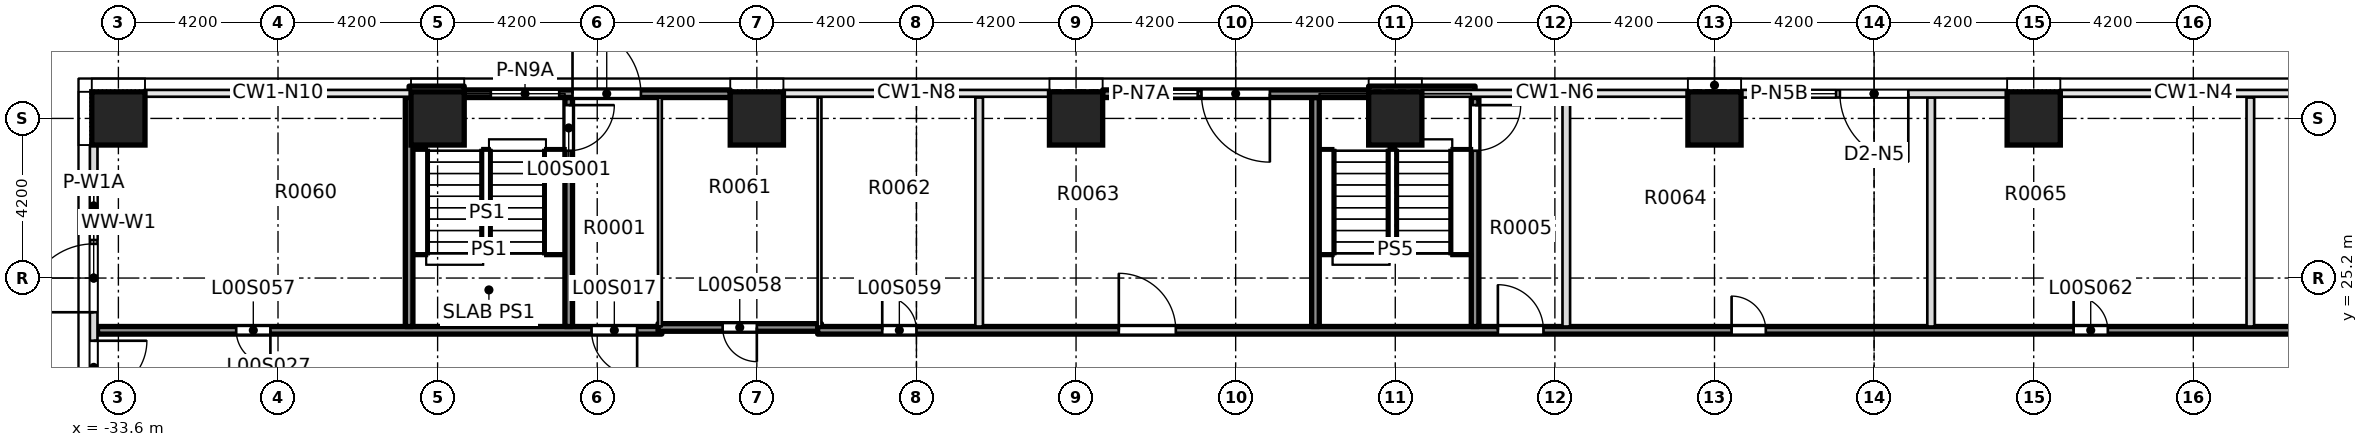
"""IFC4 building model, lengths in metres.
Left out: names, types, materials, properties, quantities, classifications, styles, units other than length and angle.
Written with IfcOpenShell. Run it as: python <this file> out.ifc"""

import sys

from ifc_helpers import new_model, si_unit, direction, frame, frame_2d, origin, origin_2d, place, context, subcontext, project, spatial, rectangle, extrude, element, fill, save


model = new_model("IFC4")
c1 = context("Model", 3, precision=1e-05, world=origin(), true_north=direction((0.0, 1.0)))
c2 = subcontext(c1, "Body", "Model", "MODEL_VIEW")
j1 = project(units=[si_unit("LENGTHUNIT", "METRE"), si_unit("PLANEANGLEUNIT", "RADIAN")], contexts=[c1])
p1 = place(None, origin())
s1 = spatial("IfcSite", under=j1, at=p1, CompositionType="ELEMENT")
p2 = place(p1, origin())
s2 = spatial("IfcBuilding", under=s1, at=p2, CompositionType="ELEMENT")
p3 = place(p2, origin())
s3 = spatial("IfcBuildingStorey", under=s2, at=p3, CompositionType="ELEMENT", Elevation=0.0)
for number, where, z_axis, x_axis in (
    (1, (-33.6, 29.4, 0.0), (0.0, 0.0, 1.0), (1.0, 0.0, 0.0)),
    (2, (-25.2, 29.4, 0.0), (0.0, 0.0, 1.0), (1.0, 0.0, 0.0)),
    (3, (-16.8, 29.4, 0.0), (0.0, 0.0, 1.0), (1.0, 0.0, 0.0)),
    (4, (-8.4, 29.4, 0.0), (0.0, 0.0, 1.0), (1.0, 0.0, 0.0)),
    (5, (0.0, 29.4, 0.0), (0.0, 0.0, 1.0), (1.0, 0.0, 0.0)),
    (6, (8.4, 29.4, 0.0), (0.0, 0.0, 1.0), (1.0, 0.0, 0.0)),
    (7, (16.8, 29.4, 0.0), (0.0, 0.0, 1.0), (1.0, 0.0, 0.0)),
):
    element("IfcColumn", number, at=place(p3, frame(where, z_axis=z_axis, x_axis=x_axis)), inside=s3, PredefinedType="COLUMN", context=c2, shape_type="SweptSolid", body=[
        extrude(rectangle(XDim=1.4, YDim=1.4, at=origin_2d()), origin(), (0.0, 0.0, 1.0), 7.5),
    ])
p4 = place(p3, frame((-34.15, 23.825, 0.0), z_axis=(0.0, 0.0, 1.0), x_axis=(1.0, 0.0, 0.0)))
e8 = element("IfcWall", 8, at=p4, inside=s3, PredefinedType="SOLIDWALL", context=c2, shape_type="SweptSolid", body=[
    extrude(rectangle(XDim=14.85, YDim=0.2, at=frame_2d((7.425, 0.0))), origin(), (0.0, 0.0, 1.0), 7.1),
])
p5 = place(p4, frame((13.0, 0.0, 0.0)))
e9 = element("IfcOpeningElement", 9, at=p5, cuts=e8, PredefinedType="OPENING", context=c2, shape_type="SweptSolid", body=[
    extrude(rectangle(XDim=1.2, YDim=2.1, at=frame_2d((0.6, 1.05))), frame((0.0, 0.11, 0.0), z_axis=(0.0, -1.0, 0.0), x_axis=(1.0, 0.0, 0.0)), (0.0, 0.0, 1.0), 0.22),
])
p6 = place(p4, frame((3.65, 0.0, 0.0)))
e10 = element("IfcOpeningElement", 10, at=p6, cuts=e8, PredefinedType="OPENING", context=c2, shape_type="SweptSolid", body=[
    extrude(rectangle(XDim=0.9, YDim=2.1, at=frame_2d((0.45, 1.05))), frame((0.0, 0.11, 0.0), z_axis=(0.0, -1.0, 0.0), x_axis=(1.0, 0.0, 0.0)), (0.0, 0.0, 1.0), 0.22),
])
p7 = place(p3, frame((-19.4, 23.9, 0.0), z_axis=(0.0, 0.0, 1.0), x_axis=(1.0, 0.0, 0.0)))
e11 = element("IfcWall", 11, at=p7, inside=s3, PredefinedType="SOLIDWALL", context=c2, shape_type="SweptSolid", body=[
    extrude(rectangle(XDim=4.3, YDim=0.2, at=frame_2d((2.15, 0.0))), origin(), (0.0, 0.0, 1.0), 7.1),
])
p8 = place(p7, frame((1.7, 0.0, 0.0)))
e12 = element("IfcOpeningElement", 12, at=p8, cuts=e11, PredefinedType="OPENING", context=c2, shape_type="SweptSolid", body=[
    extrude(rectangle(XDim=0.9, YDim=2.1, at=frame_2d((0.45, 1.05))), frame((0.0, 0.11, 0.0), z_axis=(0.0, -1.0, 0.0), x_axis=(1.0, 0.0, 0.0)), (0.0, 0.0, 1.0), 0.22),
])
p9 = place(p3, frame((-15.2, 23.825, 0.0), z_axis=(0.0, 0.0, 1.0), x_axis=(1.0, 0.0, 0.0)))
e13 = element("IfcWall", 13, at=p9, inside=s3, PredefinedType="SOLIDWALL", context=c2, shape_type="SweptSolid", body=[
    extrude(rectangle(XDim=51.45, YDim=0.2, at=frame_2d((25.725, 0.0))), origin(), (0.0, 0.0, 1.0), 7.1),
])
p10 = place(p9, frame((17.9, 0.0, 0.0)))
e14 = element("IfcOpeningElement", 14, at=p10, cuts=e13, PredefinedType="OPENING", context=c2, shape_type="SweptSolid", body=[
    extrude(rectangle(XDim=1.2, YDim=2.1, at=frame_2d((0.6, 1.05))), frame((0.0, 0.11, 0.0), z_axis=(0.0, -1.0, 0.0), x_axis=(1.0, 0.0, 0.0)), (0.0, 0.0, 1.0), 0.22),
])
p11 = place(p9, frame((1.7, 0.0, 0.0)))
e15 = element("IfcOpeningElement", 15, at=p11, cuts=e13, PredefinedType="OPENING", context=c2, shape_type="SweptSolid", body=[
    extrude(rectangle(XDim=0.9, YDim=2.1, at=frame_2d((0.45, 1.05))), frame((0.0, 0.11, 0.0), z_axis=(0.0, -1.0, 0.0), x_axis=(1.0, 0.0, 0.0)), (0.0, 0.0, 1.0), 0.22),
])
p12 = place(p9, frame((7.925, 0.0, 0.0)))
e16 = element("IfcOpeningElement", 16, at=p12, cuts=e13, PredefinedType="OPENING", context=c2, shape_type="SweptSolid", body=[
    extrude(rectangle(XDim=1.5, YDim=2.1, at=frame_2d((0.75, 1.05))), frame((0.0, 0.11, 0.0), z_axis=(0.0, -1.0, 0.0), x_axis=(1.0, 0.0, 0.0)), (0.0, 0.0, 1.0), 0.22),
])
p13 = place(p9, frame((24.05, 0.0, 0.0)))
e17 = element("IfcOpeningElement", 17, at=p13, cuts=e13, PredefinedType="OPENING", context=c2, shape_type="SweptSolid", body=[
    extrude(rectangle(XDim=0.9, YDim=2.1, at=frame_2d((0.45, 1.05))), frame((0.0, 0.11, 0.0), z_axis=(0.0, -1.0, 0.0), x_axis=(1.0, 0.0, 0.0)), (0.0, 0.0, 1.0), 0.22),
])
p14 = place(p9, frame((33.05, 0.0, 0.0)))
e18 = element("IfcOpeningElement", 18, at=p14, cuts=e13, PredefinedType="OPENING", context=c2, shape_type="SweptSolid", body=[
    extrude(rectangle(XDim=0.9, YDim=2.1, at=frame_2d((0.45, 1.05))), frame((0.0, 0.11, 0.0), z_axis=(0.0, -1.0, 0.0), x_axis=(1.0, 0.0, 0.0)), (0.0, 0.0, 1.0), 0.22),
])
p15 = place(p9, frame((44.075, 0.0, 0.0)))
e19 = element("IfcOpeningElement", 19, at=p15, cuts=e13, PredefinedType="OPENING", context=c2, shape_type="SweptSolid", body=[
    extrude(rectangle(XDim=0.9, YDim=2.1, at=frame_2d((0.45, 1.05))), frame((0.0, 0.11, 0.0), z_axis=(0.0, -1.0, 0.0), x_axis=(1.0, 0.0, 0.0)), (0.0, 0.0, 1.0), 0.22),
])
p16 = place(p3, frame((-25.95, 23.925, 0.0), z_axis=(0.0, 0.0, 1.0), x_axis=(0.0, 1.0, 0.0)))
e20 = element("IfcWall", 20, at=p16, inside=s3, PredefinedType="SOLIDWALL", context=c2, shape_type="SweptSolid", body=[
    extrude(rectangle(XDim=6.025, YDim=0.2, at=frame_2d((3.012, 0.0))), origin(), (0.0, 0.0, 1.0), 7.1),
])
p17 = place(p3, frame((-21.75, 23.925, 0.0), z_axis=(0.0, 0.0, 1.0), x_axis=(0.0, 1.0, 0.0)))
e21 = element("IfcWall", 21, at=p17, inside=s3, PredefinedType="SOLIDWALL", context=c2, shape_type="SweptSolid", body=[
    extrude(rectangle(XDim=6.025, YDim=0.2, at=frame_2d((3.012, 0.0))), origin(), (0.0, 0.0, 1.0), 7.1),
])
p18 = place(p17, frame((4.625, 0.0, 0.0)))
e22 = element("IfcOpeningElement", 22, at=p18, cuts=e21, PredefinedType="OPENING", context=c2, shape_type="SweptSolid", body=[
    extrude(rectangle(XDim=1.2, YDim=2.1, at=frame_2d((0.6, 1.05))), frame((0.0, 0.11, 0.0), z_axis=(0.0, -1.0, 0.0), x_axis=(1.0, 0.0, 0.0)), (0.0, 0.0, 1.0), 0.22),
])
for number, where, z_axis, x_axis in (
    (23, (-19.35, 23.925, 0.0), (0.0, 0.0, 1.0), (0.0, 1.0, 0.0)),
    (24, (-15.15, 23.925, 0.0), (0.0, 0.0, 1.0), (0.0, 1.0, 0.0)),
):
    element("IfcWall", number, at=place(p3, frame(where, z_axis=z_axis, x_axis=x_axis)), inside=s3, PredefinedType="PARTITIONING", context=c2, shape_type="SweptSolid", body=[
        extrude(rectangle(XDim=6.025, YDim=0.1, at=frame_2d((3.012, 0.0))), origin(), (0.0, 0.0, 1.0), 7.1),
    ])
p19 = place(p3, frame((-10.95, 23.925, 0.0), z_axis=(0.0, 0.0, 1.0), x_axis=(0.0, 1.0, 0.0)))
e25 = element("IfcWall", 25, at=p19, inside=s3, PredefinedType="PARTITIONING", context=c2, shape_type="SweptSolid", body=[
    extrude(rectangle(XDim=6.025, YDim=0.2, at=frame_2d((3.012, 0.0))), origin(), (0.0, 0.0, 1.0), 7.1),
])
p20 = place(p3, frame((-2.1, 23.925, 0.0), z_axis=(0.0, 0.0, 1.0), x_axis=(0.0, 1.0, 0.0)))
e26 = element("IfcWall", 26, at=p20, inside=s3, PredefinedType="SOLIDWALL", context=c2, shape_type="SweptSolid", body=[
    extrude(rectangle(XDim=6.025, YDim=0.2, at=frame_2d((3.012, 0.0))), origin(), (0.0, 0.0, 1.0), 7.1),
])
p21 = place(p3, frame((2.1, 23.925, 0.0), z_axis=(0.0, 0.0, 1.0), x_axis=(0.0, 1.0, 0.0)))
e27 = element("IfcWall", 27, at=p21, inside=s3, PredefinedType="SOLIDWALL", context=c2, shape_type="SweptSolid", body=[
    extrude(rectangle(XDim=6.025, YDim=0.2, at=frame_2d((3.012, 0.0))), origin(), (0.0, 0.0, 1.0), 7.1),
])
p22 = place(p21, frame((4.625, 0.0, 0.0)))
e28 = element("IfcOpeningElement", 28, at=p22, cuts=e27, PredefinedType="OPENING", context=c2, shape_type="SweptSolid", body=[
    extrude(rectangle(XDim=1.2, YDim=2.1, at=frame_2d((0.6, 1.05))), frame((0.0, 0.11, 0.0), z_axis=(0.0, -1.0, 0.0), x_axis=(1.0, 0.0, 0.0)), (0.0, 0.0, 1.0), 0.22),
])
for number, where, z_axis, x_axis in (
    (29, (4.5, 23.925, 0.0), (0.0, 0.0, 1.0), (0.0, 1.0, 0.0)),
    (30, (14.1, 23.925, 0.0), (0.0, 0.0, 1.0), (0.0, 1.0, 0.0)),
    (31, (22.5, 23.925, 0.0), (0.0, 0.0, 1.0), (0.0, 1.0, 0.0)),
):
    element("IfcWall", number, at=place(p3, frame(where, z_axis=z_axis, x_axis=x_axis)), inside=s3, PredefinedType="PARTITIONING", context=c2, shape_type="SweptSolid", body=[
        extrude(rectangle(XDim=6.025, YDim=0.2, at=frame_2d((3.012, 0.0))), origin(), (0.0, 0.0, 1.0), 7.1),
    ])
p23 = place(p3, frame((9.1, 30.05, 0.0), z_axis=(0.0, 0.0, 1.0), x_axis=(1.0, 0.0, 0.0)))
e32 = element("IfcWall", 32, at=p23, inside=s3, PredefinedType="STANDARD", context=c2, shape_type="SweptSolid", body=[
    extrude(rectangle(XDim=7.0, YDim=0.2, at=frame_2d((3.5, 0.0))), origin(), (0.0, 0.0, 1.0), 7.1),
])
p24 = place(p23, frame((2.6, 0.0, 0.0)))
e33 = element("IfcOpeningElement", 33, at=p24, cuts=e32, PredefinedType="OPENING", context=c2, shape_type="SweptSolid", body=[
    extrude(rectangle(XDim=1.8, YDim=2.4, at=frame_2d((0.9, 1.2))), frame((0.0, 0.11, 0.0), z_axis=(0.0, -1.0, 0.0), x_axis=(1.0, 0.0, 0.0)), (0.0, 0.0, 1.0), 0.22),
])
p25 = place(p23, frame((0.7, 0.0, 0.3)))
e34 = element("IfcOpeningElement", 34, at=p25, cuts=e32, PredefinedType="OPENING", context=c2, shape_type="SweptSolid", body=[
    extrude(rectangle(XDim=1.8, YDim=4.2, at=frame_2d((0.9, 2.1))), frame((0.0, 0.11, 0.0), z_axis=(0.0, -1.0, 0.0), x_axis=(1.0, 0.0, 0.0)), (0.0, 0.0, 1.0), 0.22),
])
p26 = place(p3, frame((-7.7, 30.05, 0.0), z_axis=(0.0, 0.0, 1.0), x_axis=(1.0, 0.0, 0.0)))
e35 = element("IfcWall", 35, at=p26, inside=s3, PredefinedType="SOLIDWALL", context=c2, shape_type="SweptSolid", body=[
    extrude(rectangle(XDim=7.0, YDim=0.2, at=frame_2d((3.5, 0.0))), origin(), (0.0, 0.0, 1.0), 7.1),
])
p27 = place(p26, frame((0.7, 0.0, 0.3)))
e36 = element("IfcOpeningElement", 36, at=p27, cuts=e35, PredefinedType="OPENING", context=c2, shape_type="SweptSolid", body=[
    extrude(rectangle(XDim=1.8, YDim=4.2, at=frame_2d((0.9, 2.1))), frame((0.0, 0.11, 0.0), z_axis=(0.0, -1.0, 0.0), x_axis=(1.0, 0.0, 0.0)), (0.0, 0.0, 1.0), 0.22),
])
p28 = place(p26, frame((2.6, 0.0, 0.0)))
e37 = element("IfcOpeningElement", 37, at=p28, cuts=e35, PredefinedType="OPENING", context=c2, shape_type="SweptSolid", body=[
    extrude(rectangle(XDim=1.8, YDim=2.4, at=frame_2d((0.9, 1.2))), frame((0.0, 0.11, 0.0), z_axis=(0.0, -1.0, 0.0), x_axis=(1.0, 0.0, 0.0)), (0.0, 0.0, 1.0), 0.22),
])
p29 = place(p3, frame((-24.5, 30.05, 0.0), z_axis=(0.0, 0.0, 1.0), x_axis=(1.0, 0.0, 0.0)))
e38 = element("IfcWall", 38, at=p29, inside=s3, PredefinedType="SOLIDWALL", context=c2, shape_type="SweptSolid", body=[
    extrude(rectangle(XDim=7.0, YDim=0.2, at=frame_2d((3.5, 0.0))), origin(), (0.0, 0.0, 1.0), 7.1),
])
p30 = place(p29, frame((0.7, 0.0, 0.3)))
e39 = element("IfcOpeningElement", 39, at=p30, cuts=e38, PredefinedType="OPENING", context=c2, shape_type="SweptSolid", body=[
    extrude(rectangle(XDim=1.8, YDim=4.2, at=frame_2d((0.9, 2.1))), frame((0.0, 0.11, 0.0), z_axis=(0.0, -1.0, 0.0), x_axis=(1.0, 0.0, 0.0)), (0.0, 0.0, 1.0), 0.22),
])
p31 = place(p29, frame((2.85, 0.0, 0.0)))
e40 = element("IfcOpeningElement", 40, at=p31, cuts=e38, PredefinedType="OPENING", context=c2, shape_type="SweptSolid", body=[
    extrude(rectangle(XDim=1.8, YDim=2.4, at=frame_2d((0.9, 1.2))), frame((0.0, 0.11, 0.0), z_axis=(0.0, -1.0, 0.0), x_axis=(1.0, 0.0, 0.0)), (0.0, 0.0, 1.0), 0.22),
])
p32 = place(p3, frame((-34.25, 21.7, 0.0), z_axis=(0.0, 0.0, 1.0), x_axis=(0.0, 1.0, 0.0)))
e41 = element("IfcWall", 41, at=p32, inside=s3, PredefinedType="STANDARD", context=c2, shape_type="SweptSolid", body=[
    extrude(rectangle(XDim=7.0, YDim=0.2, at=frame_2d((3.5, 0.0))), origin(), (0.0, 0.0, 1.0), 7.1),
])
p33 = place(p32, frame((4.5, 0.0, 0.3)))
e42 = element("IfcOpeningElement", 42, at=p33, cuts=e41, PredefinedType="OPENING", context=c2, shape_type="SweptSolid", body=[
    extrude(rectangle(XDim=1.8, YDim=4.2, at=frame_2d((0.9, 2.1))), frame((0.0, 0.11, 0.0), z_axis=(0.0, -1.0, 0.0), x_axis=(1.0, 0.0, 0.0)), (0.0, 0.0, 1.0), 0.22),
])
p34 = place(p32, frame((2.6, 0.0, 0.0)))
e43 = element("IfcOpeningElement", 43, at=p34, cuts=e41, PredefinedType="OPENING", context=c2, shape_type="SweptSolid", body=[
    extrude(rectangle(XDim=1.8, YDim=2.4, at=frame_2d((0.9, 1.2))), frame((0.0, 0.11, 0.0), z_axis=(0.0, -1.0, 0.0), x_axis=(1.0, 0.0, 0.0)), (0.0, 0.0, 1.0), 0.22),
])
p35 = place(p32, frame((0.45, 0.0, 0.0)))
e44 = element("IfcOpeningElement", 44, at=p35, cuts=e41, PredefinedType="OPENING", context=c2, shape_type="SweptSolid", body=[
    extrude(rectangle(XDim=1.4, YDim=2.1, at=frame_2d((0.7, 1.05))), frame((0.0, 0.11, 0.0), z_axis=(0.0, -1.0, 0.0), x_axis=(1.0, 0.0, 0.0)), (0.0, 0.0, 1.0), 0.22),
])
p36 = place(p3, frame((-25.95, 30.15, 0.0), z_axis=(0.0, 0.0, 1.0), x_axis=(1.0, 0.0, 0.0)))
e45 = element("IfcWall", 45, at=p36, inside=s3, PredefinedType="SOLIDWALL", context=c2, shape_type="SweptSolid", body=[
    extrude(rectangle(XDim=1.45, YDim=0.2, at=frame_2d((0.725, 0.0))), origin(), (0.0, 0.0, 1.0), 7.1),
])
p37 = place(p3, frame((-0.7, 30.15, 0.0), z_axis=(0.0, 0.0, 1.0), x_axis=(1.0, 0.0, 0.0)))
e46 = element("IfcWall", 46, at=p37, inside=s3, PredefinedType="SOLIDWALL", context=c2, shape_type="SweptSolid", body=[
    extrude(rectangle(XDim=2.8, YDim=0.2, at=frame_2d((1.4, 0.0))), origin(), (0.0, 0.0, 1.0), 7.1),
])
p38 = place(p18, origin())
e47 = element("IfcDoor", 47, at=p38, inside=s3, OperationType="DOUBLE_DOOR_SINGLE_SWING", PredefinedType="DOOR", context=c2, shape_type="SweptSolid", body=[
    extrude(rectangle(XDim=1.2, YDim=2.1, at=frame_2d((0.6, 1.05))), frame((0.0, 0.025, 0.0), z_axis=(0.0, -1.0, 0.0), x_axis=(1.0, 0.0, 0.0)), (0.0, 0.0, 1.0), 0.05),
])
fill(e22, e47)
p39 = place(p22, origin())
e48 = element("IfcDoor", 48, at=p39, inside=s3, OperationType="DOUBLE_DOOR_SINGLE_SWING", PredefinedType="DOOR", context=c2, shape_type="SweptSolid", body=[
    extrude(rectangle(XDim=1.2, YDim=2.1, at=frame_2d((0.6, 1.05))), frame((0.0, 0.025, 0.0), z_axis=(0.0, -1.0, 0.0), x_axis=(1.0, 0.0, 0.0)), (0.0, 0.0, 1.0), 0.05),
])
fill(e28, e48)
p40 = place(p5, origin())
e49 = element("IfcDoor", 49, at=p40, inside=s3, OperationType="SINGLE_SWING_RIGHT", PredefinedType="DOOR", context=c2, shape_type="SweptSolid", body=[
    extrude(rectangle(XDim=1.2, YDim=2.1, at=frame_2d((0.6, 1.05))), frame((0.0, 0.025, 0.0), z_axis=(0.0, -1.0, 0.0), x_axis=(1.0, 0.0, 0.0)), (0.0, 0.0, 1.0), 0.05),
])
fill(e9, e49)
p41 = place(p10, origin())
e50 = element("IfcDoor", 50, at=p41, inside=s3, OperationType="SINGLE_SWING_RIGHT", PredefinedType="DOOR", context=c2, shape_type="SweptSolid", body=[
    extrude(rectangle(XDim=1.2, YDim=2.1, at=frame_2d((0.6, 1.05))), frame((0.0, 0.025, 0.0), z_axis=(0.0, -1.0, 0.0), x_axis=(1.0, 0.0, 0.0)), (0.0, 0.0, 1.0), 0.05),
])
fill(e14, e50)
p42 = place(p6, origin())
e51 = element("IfcDoor", 51, at=p42, inside=s3, OperationType="SINGLE_SWING_LEFT", PredefinedType="DOOR", context=c2, shape_type="SweptSolid", body=[
    extrude(rectangle(XDim=0.9, YDim=2.1, at=frame_2d((0.45, 1.05))), frame((0.0, 0.025, 0.0), z_axis=(0.0, -1.0, 0.0), x_axis=(1.0, 0.0, 0.0)), (0.0, 0.0, 1.0), 0.05),
])
fill(e10, e51)
p43 = place(p8, origin())
e52 = element("IfcDoor", 52, at=p43, inside=s3, OperationType="SINGLE_SWING_RIGHT", PredefinedType="DOOR", context=c2, shape_type="SweptSolid", body=[
    extrude(rectangle(XDim=0.9, YDim=2.1, at=frame_2d((0.45, 1.05))), frame((0.0, 0.025, 0.0), z_axis=(0.0, -1.0, 0.0), x_axis=(1.0, 0.0, 0.0)), (0.0, 0.0, 1.0), 0.05),
])
fill(e12, e52)
p44 = place(p11, origin())
e53 = element("IfcDoor", 53, at=p44, inside=s3, OperationType="SINGLE_SWING_RIGHT", PredefinedType="DOOR", context=c2, shape_type="SweptSolid", body=[
    extrude(rectangle(XDim=0.9, YDim=2.1, at=frame_2d((0.45, 1.05))), frame((0.0, 0.025, 0.0), z_axis=(0.0, -1.0, 0.0), x_axis=(1.0, 0.0, 0.0)), (0.0, 0.0, 1.0), 0.05),
])
fill(e15, e53)
p45 = place(p12, origin())
e54 = element("IfcDoor", 54, at=p45, inside=s3, OperationType="DOUBLE_DOOR_SINGLE_SWING", PredefinedType="DOOR", context=c2, shape_type="SweptSolid", body=[
    extrude(rectangle(XDim=1.5, YDim=2.1, at=frame_2d((0.75, 1.05))), frame((0.0, 0.025, 0.0), z_axis=(0.0, -1.0, 0.0), x_axis=(1.0, 0.0, 0.0)), (0.0, 0.0, 1.0), 0.05),
])
fill(e16, e54)
p46 = place(p13, origin())
e55 = element("IfcDoor", 55, at=p46, inside=s3, OperationType="SINGLE_SWING_LEFT", PredefinedType="DOOR", context=c2, shape_type="SweptSolid", body=[
    extrude(rectangle(XDim=0.9, YDim=2.1, at=frame_2d((0.45, 1.05))), frame((0.0, 0.025, 0.0), z_axis=(0.0, -1.0, 0.0), x_axis=(1.0, 0.0, 0.0)), (0.0, 0.0, 1.0), 0.05),
])
fill(e17, e55)
p47 = place(p14, origin())
e56 = element("IfcDoor", 56, at=p47, inside=s3, OperationType="SINGLE_SWING_LEFT", PredefinedType="DOOR", context=c2, shape_type="SweptSolid", body=[
    extrude(rectangle(XDim=0.9, YDim=2.1, at=frame_2d((0.45, 1.05))), frame((0.0, 0.025, 0.0), z_axis=(0.0, -1.0, 0.0), x_axis=(1.0, 0.0, 0.0)), (0.0, 0.0, 1.0), 0.05),
])
fill(e18, e56)
p48 = place(p24, origin())
e57 = element("IfcDoor", 57, at=p48, inside=s3, OperationType="SINGLE_SWING_LEFT", PredefinedType="DOOR", context=c2, shape_type="SweptSolid", body=[
    extrude(rectangle(XDim=1.8, YDim=2.4, at=frame_2d((0.9, 1.2))), frame((0.0, 0.025, 0.0), z_axis=(0.0, -1.0, 0.0), x_axis=(1.0, 0.0, 0.0)), (0.0, 0.0, 1.0), 0.05),
])
fill(e33, e57)
p49 = place(p25, origin())
e58 = element("IfcWindow", 58, at=p49, inside=s3, PartitioningType="SINGLE_PANEL", PredefinedType="WINDOW", context=c2, shape_type="SweptSolid", body=[
    extrude(rectangle(XDim=1.8, YDim=4.2, at=frame_2d((0.9, 2.1))), frame((0.0, 0.03, 0.0), z_axis=(0.0, -1.0, 0.0), x_axis=(1.0, 0.0, 0.0)), (0.0, 0.0, 1.0), 0.06),
])
fill(e34, e58)
p50 = place(p27, origin())
e59 = element("IfcWindow", 59, at=p50, inside=s3, PartitioningType="SINGLE_PANEL", PredefinedType="WINDOW", context=c2, shape_type="SweptSolid", body=[
    extrude(rectangle(XDim=1.8, YDim=4.2, at=frame_2d((0.9, 2.1))), frame((0.0, 0.03, 0.0), z_axis=(0.0, -1.0, 0.0), x_axis=(1.0, 0.0, 0.0)), (0.0, 0.0, 1.0), 0.06),
])
fill(e36, e59)
p51 = place(p28, origin())
e60 = element("IfcDoor", 60, at=p51, inside=s3, OperationType="SINGLE_SWING_LEFT", PredefinedType="DOOR", context=c2, shape_type="SweptSolid", body=[
    extrude(rectangle(XDim=1.8, YDim=2.4, at=frame_2d((0.9, 1.2))), frame((0.0, 0.025, 0.0), z_axis=(0.0, -1.0, 0.0), x_axis=(1.0, 0.0, 0.0)), (0.0, 0.0, 1.0), 0.05),
])
fill(e37, e60)
p52 = place(p30, origin())
e61 = element("IfcWindow", 61, at=p52, inside=s3, PartitioningType="SINGLE_PANEL", PredefinedType="WINDOW", context=c2, shape_type="SweptSolid", body=[
    extrude(rectangle(XDim=1.8, YDim=4.2, at=frame_2d((0.9, 2.1))), frame((0.0, 0.03, 0.0), z_axis=(0.0, -1.0, 0.0), x_axis=(1.0, 0.0, 0.0)), (0.0, 0.0, 1.0), 0.06),
])
fill(e39, e61)
p53 = place(p31, origin())
e62 = element("IfcDoor", 62, at=p53, inside=s3, OperationType="SINGLE_SWING_LEFT", PredefinedType="DOOR", context=c2, shape_type="SweptSolid", body=[
    extrude(rectangle(XDim=1.8, YDim=2.4, at=frame_2d((0.9, 1.2))), frame((0.0, 0.025, 0.0), z_axis=(0.0, -1.0, 0.0), x_axis=(1.0, 0.0, 0.0)), (0.0, 0.0, 1.0), 0.05),
])
fill(e40, e62)
p54 = place(p33, origin())
e63 = element("IfcWindow", 63, at=p54, inside=s3, PartitioningType="SINGLE_PANEL", PredefinedType="WINDOW", context=c2, shape_type="SweptSolid", body=[
    extrude(rectangle(XDim=1.8, YDim=4.2, at=frame_2d((0.9, 2.1))), frame((0.0, 0.03, 0.0), z_axis=(0.0, -1.0, 0.0), x_axis=(1.0, 0.0, 0.0)), (0.0, 0.0, 1.0), 0.06),
])
fill(e42, e63)
p55 = place(p34, origin())
e64 = element("IfcDoor", 64, at=p55, inside=s3, OperationType="SINGLE_SWING_LEFT", PredefinedType="DOOR", context=c2, shape_type="SweptSolid", body=[
    extrude(rectangle(XDim=1.8, YDim=2.4, at=frame_2d((0.9, 1.2))), frame((0.0, 0.025, 0.0), z_axis=(0.0, -1.0, 0.0), x_axis=(1.0, 0.0, 0.0)), (0.0, 0.0, 1.0), 0.05),
])
fill(e43, e64)
p56 = place(p35, origin())
e65 = element("IfcDoor", 65, at=p56, inside=s3, OperationType="SINGLE_SWING_LEFT", PredefinedType="DOOR", context=c2, shape_type="SweptSolid", body=[
    extrude(rectangle(XDim=1.4, YDim=2.1, at=frame_2d((0.7, 1.05))), frame((0.0, 0.025, 0.0), z_axis=(0.0, -1.0, 0.0), x_axis=(1.0, 0.0, 0.0)), (0.0, 0.0, 1.0), 0.05),
])
fill(e44, e65)
save(model, sys.argv[1])
